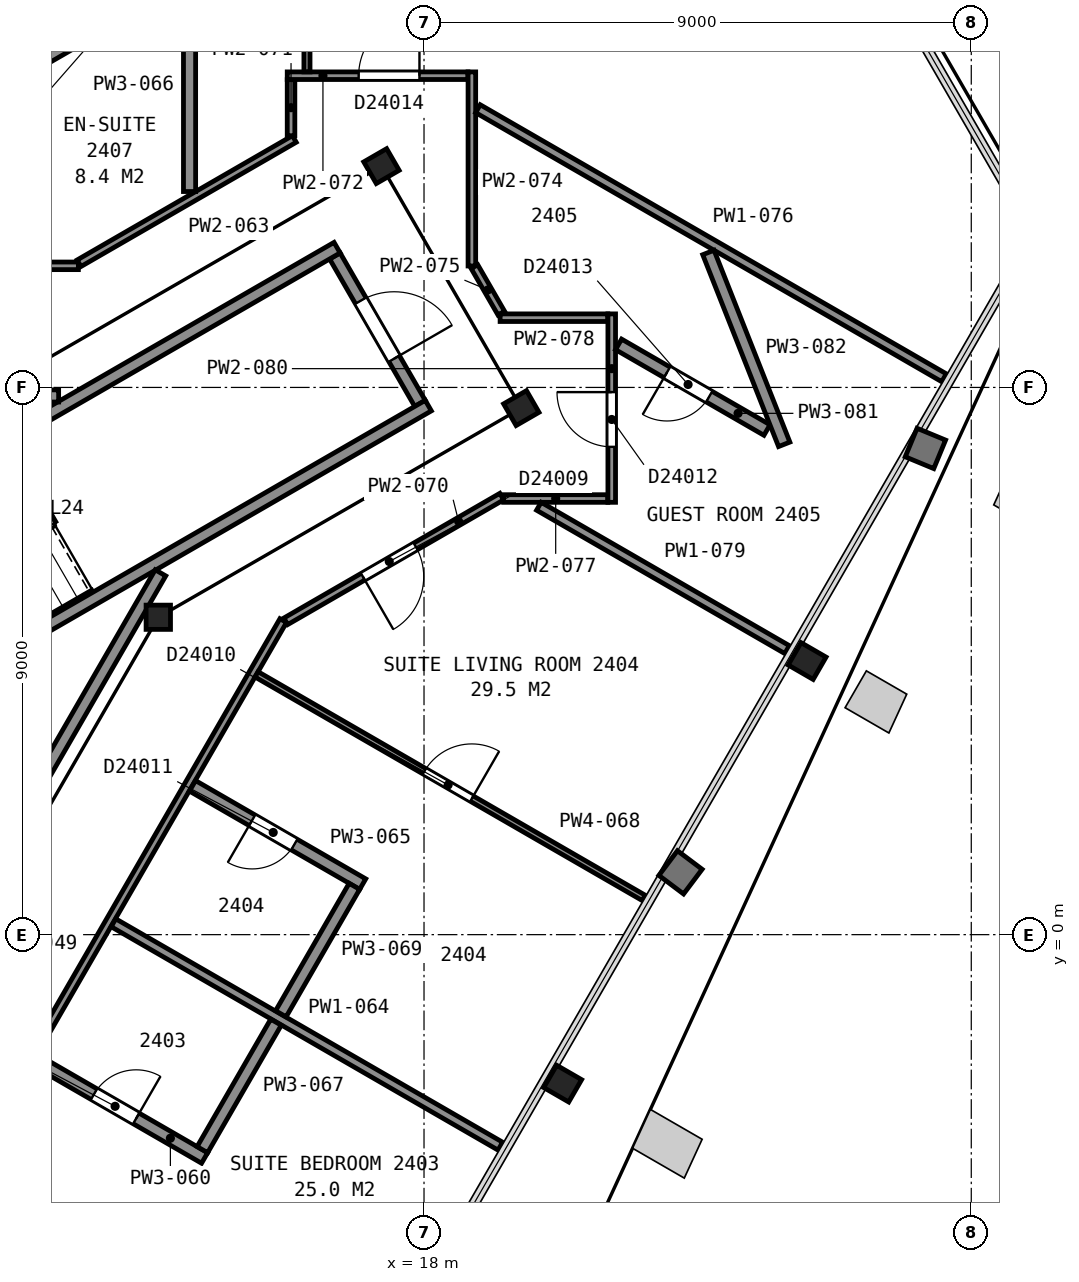
"""IFC4 building model, lengths in metres.
Left out: names, types, materials, properties, quantities, classifications, styles, units other than length and angle.
Written with IfcOpenShell. Run it as: python <this file> out.ifc"""

import sys

from ifc_helpers import new_model, si_unit, direction, frame, frame_2d, origin, origin_2d, place, context, subcontext, project, spatial, rectangle, i_section, extrude, element, fill, save


model = new_model("IFC4")
c1 = context("Model", 3, precision=1e-05, world=origin(), true_north=direction((0.0, 1.0)))
c2 = subcontext(c1, "Body", "Model", "MODEL_VIEW")
j1 = project(units=[si_unit("LENGTHUNIT", "METRE"), si_unit("PLANEANGLEUNIT", "RADIAN")], contexts=[c1])
p1 = place(None, origin())
s1 = spatial("IfcSite", under=j1, at=p1, CompositionType="ELEMENT")
p2 = place(p1, origin())
s2 = spatial("IfcBuilding", under=s1, at=p2, CompositionType="ELEMENT")
p3 = place(p2, frame((0.0, 0.0, 103.6)))
s3 = spatial("IfcBuildingStorey", under=s2, at=p3, CompositionType="ELEMENT", Elevation=103.6)
p4 = place(p3, frame((20.28, -2.45, 0.04), z_axis=(0.0, 0.0, 1.0), x_axis=(-0.5, -0.866025403784, 0.0)))
e1 = element("IfcColumn", 1, at=p4, inside=s3, PredefinedType="COLUMN", context=c2, shape_type="SweptSolid", body=[
    extrude(i_section(OverallWidth=0.424, OverallDepth=0.475, WebThickness=0.048, FlangeThickness=0.077, FilletRadius=0.015, at=origin_2d()), origin(), (0.0, 0.0, 1.0), 3.56),
])
p5 = place(p3, frame((24.3, 4.5, 0.045), z_axis=(0.0, 0.0, 1.0), x_axis=(-0.5, -0.866025403784, 0.0)))
e2 = element("IfcColumn", 2, at=p5, inside=s3, PredefinedType="COLUMN", context=c2, shape_type="SweptSolid", body=[
    extrude(i_section(OverallWidth=0.424, OverallDepth=0.475, WebThickness=0.048, FlangeThickness=0.077, FilletRadius=0.015, at=origin_2d()), origin(), (0.0, 0.0, 1.0), 3.555),
])
p6 = place(p3, frame((13.63, 5.22, 0.0), z_axis=(0.0, 0.0, 1.0), x_axis=(1.0, 0.0, 0.0)))
e3 = element("IfcColumn", 3, at=p6, inside=s3, PredefinedType="COLUMN", context=c2, shape_type="SweptSolid", body=[
    extrude(i_section(OverallWidth=0.401, OverallDepth=0.399, WebThickness=0.025, FlangeThickness=0.04, FilletRadius=0.015, at=origin_2d()), origin(), (0.0, 0.0, 1.0), 3.6),
])
for number, where, z_axis, x_axis in (
    (4, (19.6, 8.66, 0.0), (0.0, 0.0, 1.0), (0.5, -0.866, 0.0)),
    (5, (17.3, 12.64, 0.0), (0.0, 0.0, 1.0), (0.5, -0.866, 0.0)),
):
    element("IfcColumn", number, at=place(p3, frame(where, z_axis=z_axis, x_axis=x_axis)), inside=s3, PredefinedType="COLUMN", context=c2, shape_type="SweptSolid", body=[
        extrude(i_section(OverallWidth=0.411, OverallDepth=0.434, WebThickness=0.036, FlangeThickness=0.057, FilletRadius=0.015, at=origin_2d()), origin(), (0.0, 0.0, 1.0), 3.6),
    ])
p7 = place(p3, frame((17.934, 8.738, 0.0), z_axis=(0.0, 0.0, 1.0), x_axis=(-0.49998411664, 0.866034573852, 0.0)))
e6 = element("IfcWall", 6, at=p7, inside=s3, PredefinedType="PARTITIONING", context=c2, shape_type="SweptSolid", body=[
    extrude(rectangle(XDim=2.8, YDim=0.2, at=frame_2d((1.4, 0.0))), origin(), (0.0, 0.0, 1.0), 3.35),
])
p8 = place(p7, frame((0.85, 0.0, 0.0)))
e7 = element("IfcOpeningElement", 7, at=p8, cuts=e6, PredefinedType="OPENING", context=c2, shape_type="SweptSolid", body=[
    extrude(rectangle(XDim=1.1, YDim=2.1, at=frame_2d((0.55, 1.05))), frame((0.0, 0.11, 0.0), z_axis=(0.0, -1.0, 0.0), x_axis=(1.0, 0.0, 0.0)), (0.0, 0.0, 1.0), 0.22),
])
for number, where, z_axis, x_axis in (
    (8, (6.178, 5.299, 0.0), (0.0, 0.0, 1.0), (0.866, 0.5, 0.0)),
    (9, (7.678, 2.701, 0.0), (0.0, 0.0, 1.0), (0.866, 0.5, 0.0)),
):
    element("IfcWall", number, at=place(p3, frame(where, z_axis=z_axis, x_axis=x_axis)), inside=s3, PredefinedType="PARTITIONING", context=c2, shape_type="SweptSolid", body=[
        extrude(rectangle(XDim=12.0, YDim=0.2, at=frame_2d((6.0, 0.0))), origin(), (0.0, 0.0, 1.0), 3.35),
    ])
p9 = place(p3, frame((6.177, 8.86, 0.0), z_axis=(0.0, 0.0, 1.0), x_axis=(1.0, 0.0, 0.0)))
e10 = element("IfcWall", 10, at=p9, inside=s3, PredefinedType="PARTITIONING", context=c2, shape_type="SweptSolid", body=[
    extrude(rectangle(XDim=5.814, YDim=0.2, at=frame_2d((2.907, 0.0))), origin(), (0.0, 0.0, 1.0), 3.35),
])
p10 = place(p3, frame((8.492, -3.012, 0.0), z_axis=(0.0, 0.0, 1.0), x_axis=(0.499972957231, 0.866041016371, 0.0)))
e11 = element("IfcWall", 11, at=p10, inside=s3, PredefinedType="PARTITIONING", context=c2, shape_type="SweptSolid", body=[
    extrude(rectangle(XDim=10.349, YDim=0.2, at=frame_2d((5.174, 0.0))), origin(), (0.0, 0.0, 1.0), 3.35),
])
p11 = place(p3, frame((-12.315, 11.0, 0.0), z_axis=(0.0, 0.0, 1.0), x_axis=(1.0, 0.0, 0.0)))
e12 = element("IfcWall", 12, at=p11, inside=s3, PredefinedType="PARTITIONING", context=c2, shape_type="SweptSolid", body=[
    extrude(rectangle(XDim=24.631, YDim=0.125, at=frame_2d((12.315, 0.0))), origin(), (0.0, 0.0, 1.0), 2.613),
])
p12 = place(p11, frame((16.545, 0.0, 0.0)))
e13 = element("IfcOpeningElement", 13, at=p12, cuts=e12, PredefinedType="OPENING", context=c2, shape_type="SweptSolid", body=[
    extrude(rectangle(XDim=1.0, YDim=2.1, at=frame_2d((0.5, 1.05))), frame((0.0, 0.073, 0.0), z_axis=(0.0, -1.0, 0.0), x_axis=(1.0, 0.0, 0.0)), (0.0, 0.0, 1.0), 0.145),
])
p13 = place(p11, frame((12.986, 0.0, 0.0)))
e14 = element("IfcOpeningElement", 14, at=p13, cuts=e12, PredefinedType="OPENING", context=c2, shape_type="SweptSolid", body=[
    extrude(rectangle(XDim=0.9, YDim=2.1, at=frame_2d((0.45, 1.05))), frame((0.0, 0.073, 0.0), z_axis=(0.0, -1.0, 0.0), x_axis=(1.0, 0.0, 0.0)), (0.0, 0.0, 1.0), 0.145),
])
p14 = place(p11, frame((2.521, 0.0, 0.0)))
e15 = element("IfcOpeningElement", 15, at=p14, cuts=e12, PredefinedType="OPENING", context=c2, shape_type="SweptSolid", body=[
    extrude(rectangle(XDim=1.0, YDim=2.1, at=frame_2d((0.5, 1.05))), frame((0.0, 0.073, 0.0), z_axis=(0.0, -1.0, 0.0), x_axis=(1.0, 0.0, 0.0)), (0.0, 0.0, 1.0), 0.145),
])
p15 = place(p3, frame((15.684, 5.165, 0.0), z_axis=(0.0, 0.0, 1.0), x_axis=(-0.500027787016, -0.866009360349, 0.0)))
e16 = element("IfcWall", 16, at=p15, inside=s3, PredefinedType="PARTITIONING", context=c2, shape_type="SweptSolid", body=[
    extrude(rectangle(XDim=23.856, YDim=0.125, at=frame_2d((11.928, 0.0))), origin(), (0.0, 0.0, 1.0), 2.613),
])
p16 = place(p15, frame((16.996, 0.0, 0.0)))
e17 = element("IfcOpeningElement", 17, at=p16, cuts=e16, PredefinedType="OPENING", context=c2, shape_type="SweptSolid", body=[
    extrude(rectangle(XDim=1.0, YDim=2.1, at=frame_2d((0.5, 1.05))), frame((0.0, 0.073, 0.0), z_axis=(0.0, -1.0, 0.0), x_axis=(1.0, 0.0, 0.0)), (0.0, 0.0, 1.0), 0.145),
])
p17 = place(p15, frame((12.28, 0.0, 0.0)))
e18 = element("IfcOpeningElement", 18, at=p17, cuts=e16, PredefinedType="OPENING", context=c2, shape_type="SweptSolid", body=[
    extrude(rectangle(XDim=1.0, YDim=2.1, at=frame_2d((0.5, 1.05))), frame((0.0, 0.073, 0.0), z_axis=(0.0, -1.0, 0.0), x_axis=(1.0, 0.0, 0.0)), (0.0, 0.0, 1.0), 0.145),
])
p18 = place(p3, frame((10.53, -3.886, 0.0), z_axis=(0.0, 0.0, 1.0), x_axis=(0.8660606245, -0.499938990969, 0.0)))
e19 = element("IfcWall", 19, at=p18, inside=s3, PredefinedType="PARTITIONING", context=c2, shape_type="SweptSolid", body=[
    extrude(rectangle(XDim=7.353, YDim=0.1, at=frame_2d((3.676, 0.0))), origin(), (0.0, 0.0, 1.0), 2.613),
])
p19 = place(p18, frame((3.188, 0.0, 0.0)))
e20 = element("IfcOpeningElement", 20, at=p19, cuts=e19, PredefinedType="OPENING", context=c2, shape_type="SweptSolid", body=[
    extrude(rectangle(XDim=0.9, YDim=2.1, at=frame_2d((0.45, 1.05))), frame((0.0, 0.06, 0.0), z_axis=(0.0, -1.0, 0.0), x_axis=(1.0, 0.0, 0.0)), (0.0, 0.0, 1.0), 0.12),
])
p20 = place(p3, frame((11.588, -2.054, 0.0), z_axis=(0.0, 0.0, 1.0), x_axis=(0.865983377851, -0.500072783988, 0.0)))
e21 = element("IfcWall", 21, at=p20, inside=s3, PredefinedType="PARTITIONING", context=c2, shape_type="SweptSolid", body=[
    extrude(rectangle(XDim=3.237, YDim=0.2, at=frame_2d((1.619, 0.0))), origin(), (0.0, 0.0, 1.0), 2.613),
])
p21 = place(p20, frame((1.137, 0.0, 0.0)))
e22 = element("IfcOpeningElement", 22, at=p21, cuts=e21, PredefinedType="OPENING", context=c2, shape_type="SweptSolid", body=[
    extrude(rectangle(XDim=0.8, YDim=2.1, at=frame_2d((0.4, 1.05))), frame((0.0, 0.11, 0.0), z_axis=(0.0, -1.0, 0.0), x_axis=(1.0, 0.0, 0.0)), (0.0, 0.0, 1.0), 0.22),
])
p22 = place(p3, frame((13.997, 15.702, 0.0), z_axis=(0.0, 0.0, 1.0), x_axis=(-0.866066100916, -0.499929503874, 0.0)))
e23 = element("IfcWall", 23, at=p22, inside=s3, PredefinedType="PARTITIONING", context=c2, shape_type="SweptSolid", body=[
    extrude(rectangle(XDim=2.688, YDim=0.2, at=frame_2d((1.344, 0.0))), origin(), (0.0, 0.0, 1.0), 2.613),
])
p23 = place(p22, frame((0.932, 0.0, 0.0)))
e24 = element("IfcOpeningElement", 24, at=p23, cuts=e23, PredefinedType="OPENING", context=c2, shape_type="SweptSolid", body=[
    extrude(rectangle(XDim=0.8, YDim=2.1, at=frame_2d((0.4, 1.05))), frame((0.0, 0.11, 0.0), z_axis=(0.0, -1.0, 0.0), x_axis=(1.0, 0.0, 0.0)), (0.0, 0.0, 1.0), 0.22),
])
p24 = place(p3, frame((12.327, 11.042, 0.0), z_axis=(0.0, 0.0, 1.0), x_axis=(0.866070231021, 0.499922348909, 0.0)))
e25 = element("IfcWall", 25, at=p24, inside=s3, PredefinedType="PARTITIONING", context=c2, shape_type="SweptSolid", body=[
    extrude(rectangle(XDim=4.088, YDim=0.125, at=frame_2d((2.044, 0.0))), origin(), (0.0, 0.0, 1.0), 2.613),
])
p25 = place(p3, frame((12.893, 0.195, 0.0), z_axis=(0.0, 0.0, 1.0), x_axis=(0.865995225926, -0.500052265941, 0.0)))
e26 = element("IfcWall", 26, at=p25, inside=s3, PredefinedType="PARTITIONING", context=c2, shape_type="SweptSolid", body=[
    extrude(rectangle(XDim=7.347, YDim=0.15, at=frame_2d((3.674, 0.0))), origin(), (0.0, 0.0, 1.0), 2.613),
])
p26 = place(p3, frame((16.992, 0.831, 0.0), z_axis=(0.0, 0.0, 1.0), x_axis=(-0.866022073929, 0.500005767435, 0.0)))
e27 = element("IfcWall", 27, at=p26, inside=s3, PredefinedType="PARTITIONING", context=c2, shape_type="SweptSolid", body=[
    extrude(rectangle(XDim=3.232, YDim=0.2, at=frame_2d((1.616, 0.0))), origin(), (0.0, 0.0, 1.0), 2.613),
])
p27 = place(p26, frame((1.3, 0.0, 0.0)))
e28 = element("IfcOpeningElement", 28, at=p27, cuts=e27, PredefinedType="OPENING", context=c2, shape_type="SweptSolid", body=[
    extrude(rectangle(XDim=0.8, YDim=2.1, at=frame_2d((0.4, 1.05))), frame((0.0, 0.11, 0.0), z_axis=(0.0, -1.0, 0.0), x_axis=(1.0, 0.0, 0.0)), (0.0, 0.0, 1.0), 0.22),
])
p28 = place(p3, frame((14.144, 12.222, 0.0), z_axis=(0.0, 0.0, 1.0), x_axis=(0.0, 1.0, 0.0)))
e29 = element("IfcWall", 29, at=p28, inside=s3, PredefinedType="PARTITIONING", context=c2, shape_type="SweptSolid", body=[
    extrude(rectangle(XDim=3.665, YDim=0.2, at=frame_2d((1.833, 0.0))), origin(), (0.0, 0.0, 1.0), 2.613),
])
p29 = place(p3, frame((14.355, -3.536, 0.0), z_axis=(0.0, 0.0, 1.0), x_axis=(0.50002218001, 0.866012597771, 0.0)))
e30 = element("IfcWall", 30, at=p29, inside=s3, PredefinedType="PARTITIONING", context=c2, shape_type="SweptSolid", body=[
    extrude(rectangle(XDim=2.421, YDim=0.2, at=frame_2d((1.21, 0.0))), origin(), (0.0, 0.0, 1.0), 2.613),
])
p30 = place(p3, frame((21.613, 0.605, 0.0), z_axis=(0.0, 0.0, 1.0), x_axis=(-0.866021344046, 0.500007031608, 0.0)))
e31 = element("IfcWall", 31, at=p30, inside=s3, PredefinedType="PARTITIONING", context=c2, shape_type="SweptSolid", body=[
    extrude(rectangle(XDim=7.352, YDim=0.1, at=frame_2d((3.676, 0.0))), origin(), (0.0, 0.0, 1.0), 2.613),
])
p31 = place(p30, frame((3.264, 0.0, 0.0)))
e32 = element("IfcOpeningElement", 32, at=p31, cuts=e31, PredefinedType="OPENING", context=c2, shape_type="SweptSolid", body=[
    extrude(rectangle(XDim=0.9, YDim=2.1, at=frame_2d((0.45, 1.05))), frame((0.0, 0.06, 0.0), z_axis=(0.0, -1.0, 0.0), x_axis=(1.0, 0.0, 0.0)), (0.0, 0.0, 1.0), 0.12),
])
p32 = place(p3, frame((15.646, -1.302, 0.0), z_axis=(0.0, 0.0, 1.0), x_axis=(0.499719542643, 0.866187265377, 0.0)))
e33 = element("IfcWall", 33, at=p32, inside=s3, PredefinedType="PARTITIONING", context=c2, shape_type="SweptSolid", body=[
    extrude(rectangle(XDim=2.42, YDim=0.2, at=frame_2d((1.21, 0.0))), origin(), (0.0, 0.0, 1.0), 2.613),
])
p33 = place(p3, frame((19.278, 7.204, 0.0), z_axis=(0.0, 0.0, 1.0), x_axis=(-0.865992261418, -0.50005739987, 0.0)))
e34 = element("IfcWall", 34, at=p33, inside=s3, PredefinedType="PARTITIONING", context=c2, shape_type="SweptSolid", body=[
    extrude(rectangle(XDim=4.101, YDim=0.125, at=frame_2d((2.051, 0.0))), origin(), (0.0, 0.0, 1.0), 2.613),
])
p34 = place(p33, frame((1.636, 0.0, 0.0)))
e35 = element("IfcOpeningElement", 35, at=p34, cuts=e34, PredefinedType="OPENING", context=c2, shape_type="SweptSolid", body=[
    extrude(rectangle(XDim=1.0, YDim=2.1, at=frame_2d((0.5, 1.05))), frame((0.0, 0.073, 0.0), z_axis=(0.0, -1.0, 0.0), x_axis=(1.0, 0.0, 0.0)), (0.0, 0.0, 1.0), 0.145),
])
p35 = place(p3, frame((15.813, 13.14, 0.0), z_axis=(0.0, 0.0, 1.0), x_axis=(0.0, 1.0, 0.0)))
e36 = element("IfcWall", 36, at=p35, inside=s3, PredefinedType="PARTITIONING", context=c2, shape_type="SweptSolid", body=[
    extrude(rectangle(XDim=0.922, YDim=0.125, at=frame_2d((0.461, 0.0))), origin(), (0.0, 0.0, 1.0), 2.613),
])
p36 = place(p3, frame((15.75, 14.127, 0.0), z_axis=(0.0, 0.0, 1.0), x_axis=(1.0, 0.0, 0.0)))
e37 = element("IfcWall", 37, at=p36, inside=s3, PredefinedType="PARTITIONING", context=c2, shape_type="SweptSolid", body=[
    extrude(rectangle(XDim=2.971, YDim=0.125, at=frame_2d((1.486, 0.0))), origin(), (0.0, 0.0, 1.0), 2.613),
])
p37 = place(p36, frame((1.175, 0.0, 0.0)))
e38 = element("IfcOpeningElement", 38, at=p37, cuts=e37, PredefinedType="OPENING", context=c2, shape_type="SweptSolid", body=[
    extrude(rectangle(XDim=1.0, YDim=2.1, at=frame_2d((0.5, 1.05))), frame((0.0, 0.073, 0.0), z_axis=(0.0, -1.0, 0.0), x_axis=(1.0, 0.0, 0.0)), (0.0, 0.0, 1.0), 0.145),
])
p38 = place(p3, frame((16.075, 14.189, 0.0), z_axis=(0.0, 0.0, 1.0), x_axis=(0.0, 1.0, 0.0)))
e39 = element("IfcWall", 39, at=p38, inside=s3, PredefinedType="PARTITIONING", context=c2, shape_type="SweptSolid", body=[
    extrude(rectangle(XDim=4.226, YDim=0.1, at=frame_2d((2.113, 0.0))), origin(), (0.0, 0.0, 1.0), 2.613),
])
p39 = place(p38, frame((1.587, 0.0, 0.0)))
e40 = element("IfcOpeningElement", 40, at=p39, cuts=e39, PredefinedType="OPENING", context=c2, shape_type="SweptSolid", body=[
    extrude(rectangle(XDim=0.9, YDim=2.1, at=frame_2d((0.45, 1.05))), frame((0.0, 0.06, 0.0), z_axis=(0.0, -1.0, 0.0), x_axis=(1.0, 0.0, 0.0)), (0.0, 0.0, 1.0), 0.12),
])
p40 = place(p3, frame((18.787, 10.998, 0.0), z_axis=(0.0, 0.0, 1.0), x_axis=(0.0, 1.0, 0.0)))
e41 = element("IfcWall", 41, at=p40, inside=s3, PredefinedType="PARTITIONING", context=c2, shape_type="SweptSolid", body=[
    extrude(rectangle(XDim=3.192, YDim=0.125, at=frame_2d((1.596, 0.0))), origin(), (0.0, 0.0, 1.0), 2.613),
])
p41 = place(p3, frame((18.83, 10.986, 0.0), z_axis=(0.0, 0.0, 1.0), x_axis=(0.499881837328, -0.866093614288, 0.0)))
e42 = element("IfcWall", 42, at=p41, inside=s3, PredefinedType="PARTITIONING", context=c2, shape_type="SweptSolid", body=[
    extrude(rectangle(XDim=0.884, YDim=0.125, at=frame_2d((0.442, 0.0))), origin(), (0.0, 0.0, 1.0), 2.613),
])
p42 = place(p3, frame((18.887, 13.584, 0.0), z_axis=(0.0, 0.0, 1.0), x_axis=(0.866024349092, -0.500001826776, 0.0)))
e43 = element("IfcWall", 43, at=p42, inside=s3, PredefinedType="PARTITIONING", context=c2, shape_type="SweptSolid", body=[
    extrude(rectangle(XDim=8.851, YDim=0.15, at=frame_2d((4.425, 0.0))), origin(), (0.0, 0.0, 1.0), 2.613),
])
p43 = place(p3, frame((19.309, 7.173, 0.0), z_axis=(0.0, 0.0, 1.0), x_axis=(1.0, 0.0, 0.0)))
e44 = element("IfcWall", 44, at=p43, inside=s3, PredefinedType="PARTITIONING", context=c2, shape_type="SweptSolid", body=[
    extrude(rectangle(XDim=1.713, YDim=0.125, at=frame_2d((0.856, 0.0))), origin(), (0.0, 0.0, 1.0), 2.613),
])
p44 = place(p3, frame((19.251, 10.147, 0.0), z_axis=(0.0, 0.0, 1.0), x_axis=(1.0, 0.0, 0.0)))
e45 = element("IfcWall", 45, at=p44, inside=s3, PredefinedType="PARTITIONING", context=c2, shape_type="SweptSolid", body=[
    extrude(rectangle(XDim=1.771, YDim=0.125, at=frame_2d((0.885, 0.0))), origin(), (0.0, 0.0, 1.0), 2.613),
])
p45 = place(p3, frame((19.889, 7.046, 0.0), z_axis=(0.0, 0.0, 1.0), x_axis=(0.865929380849, -0.500166279733, 0.0)))
e46 = element("IfcWall", 46, at=p45, inside=s3, PredefinedType="PARTITIONING", context=c2, shape_type="SweptSolid", body=[
    extrude(rectangle(XDim=4.714, YDim=0.15, at=frame_2d((2.357, 0.0))), origin(), (0.0, 0.0, 1.0), 2.613),
])
p46 = place(p3, frame((21.087, 10.209, 0.0), z_axis=(0.0, 0.0, 1.0), x_axis=(0.0, -1.0, 0.0)))
e47 = element("IfcWall", 47, at=p46, inside=s3, PredefinedType="PARTITIONING", context=c2, shape_type="SweptSolid", body=[
    extrude(rectangle(XDim=3.099, YDim=0.125, at=frame_2d((1.549, 0.0))), origin(), (0.0, 0.0, 1.0), 2.613),
])
p47 = place(p46, frame((1.287, 0.0, 0.0)))
e48 = element("IfcOpeningElement", 48, at=p47, cuts=e47, PredefinedType="OPENING", context=c2, shape_type="SweptSolid", body=[
    extrude(rectangle(XDim=0.9, YDim=2.1, at=frame_2d((0.45, 1.05))), frame((0.0, 0.073, 0.0), z_axis=(0.0, -1.0, 0.0), x_axis=(1.0, 0.0, 0.0)), (0.0, 0.0, 1.0), 0.145),
])
p48 = place(p3, frame((21.199, 9.708, 0.0), z_axis=(0.0, 0.0, 1.0), x_axis=(0.866129327763, -0.499819955173, 0.0)))
e49 = element("IfcWall", 49, at=p48, inside=s3, PredefinedType="PARTITIONING", context=c2, shape_type="SweptSolid", body=[
    extrude(rectangle(XDim=2.818, YDim=0.2, at=frame_2d((1.409, 0.0))), origin(), (0.0, 0.0, 1.0), 2.613),
])
p49 = place(p48, frame((0.92, 0.0, 0.0)))
e50 = element("IfcOpeningElement", 50, at=p49, cuts=e49, PredefinedType="OPENING", context=c2, shape_type="SweptSolid", body=[
    extrude(rectangle(XDim=0.8, YDim=2.1, at=frame_2d((0.4, 1.05))), frame((0.0, 0.11, 0.0), z_axis=(0.0, -1.0, 0.0), x_axis=(1.0, 0.0, 0.0)), (0.0, 0.0, 1.0), 0.22),
])
p50 = place(p3, frame((22.677, 11.22, 0.0), z_axis=(0.0, 0.0, 1.0), x_axis=(0.36751707294, -0.930016774632, 0.0)))
e51 = element("IfcWall", 51, at=p50, inside=s3, PredefinedType="PARTITIONING", context=c2, shape_type="SweptSolid", body=[
    extrude(rectangle(XDim=3.393, YDim=0.2, at=frame_2d((1.697, 0.0))), origin(), (0.0, 0.0, 1.0), 2.613),
])
p51 = place(p8, origin())
e52 = element("IfcDoor", 52, at=p51, inside=s3, OperationType="SINGLE_SWING_LEFT", PredefinedType="DOOR", context=c2, shape_type="SweptSolid", body=[
    extrude(rectangle(XDim=1.1, YDim=2.1, at=frame_2d((0.55, 1.05))), frame((0.0, 0.025, 0.0), z_axis=(0.0, -1.0, 0.0), x_axis=(1.0, 0.0, 0.0)), (0.0, 0.0, 1.0), 0.05),
])
fill(e7, e52)
p52 = place(p21, origin())
e53 = element("IfcDoor", 53, at=p52, inside=s3, OperationType="SINGLE_SWING_RIGHT", PredefinedType="DOOR", context=c2, shape_type="SweptSolid", body=[
    extrude(rectangle(XDim=0.8, YDim=2.1, at=frame_2d((0.4, 1.05))), frame((0.0, 0.025, 0.0), z_axis=(0.0, -1.0, 0.0), x_axis=(1.0, 0.0, 0.0)), (0.0, 0.0, 1.0), 0.05),
])
fill(e22, e53)
p53 = place(p27, origin())
e54 = element("IfcDoor", 54, at=p53, inside=s3, OperationType="SINGLE_SWING_RIGHT", PredefinedType="DOOR", context=c2, shape_type="SweptSolid", body=[
    extrude(rectangle(XDim=0.8, YDim=2.1, at=frame_2d((0.4, 1.05))), frame((0.0, 0.025, 0.0), z_axis=(0.0, -1.0, 0.0), x_axis=(1.0, 0.0, 0.0)), (0.0, 0.0, 1.0), 0.05),
])
fill(e28, e54)
p54 = place(p31, origin())
e55 = element("IfcDoor", 55, at=p54, inside=s3, OperationType="SINGLE_SWING_LEFT", PredefinedType="DOOR", context=c2, shape_type="SweptSolid", body=[
    extrude(rectangle(XDim=0.9, YDim=2.1, at=frame_2d((0.45, 1.05))), frame((0.0, 0.025, 0.0), z_axis=(0.0, -1.0, 0.0), x_axis=(1.0, 0.0, 0.0)), (0.0, 0.0, 1.0), 0.05),
])
fill(e32, e55)
p55 = place(p34, origin())
e56 = element("IfcDoor", 56, at=p55, inside=s3, OperationType="SINGLE_SWING_RIGHT", PredefinedType="DOOR", context=c2, shape_type="SweptSolid", body=[
    extrude(rectangle(XDim=1.0, YDim=2.1, at=frame_2d((0.5, 1.05))), frame((0.0, 0.025, 0.0), z_axis=(0.0, -1.0, 0.0), x_axis=(1.0, 0.0, 0.0)), (0.0, 0.0, 1.0), 0.05),
])
fill(e35, e56)
p56 = place(p37, origin())
e57 = element("IfcDoor", 57, at=p56, inside=s3, OperationType="SINGLE_SWING_RIGHT", PredefinedType="DOOR", context=c2, shape_type="SweptSolid", body=[
    extrude(rectangle(XDim=1.0, YDim=2.1, at=frame_2d((0.5, 1.05))), frame((0.0, 0.025, 0.0), z_axis=(0.0, -1.0, 0.0), x_axis=(1.0, 0.0, 0.0)), (0.0, 0.0, 1.0), 0.05),
])
fill(e38, e57)
p57 = place(p47, origin())
e58 = element("IfcDoor", 58, at=p57, inside=s3, OperationType="SINGLE_SWING_LEFT", PredefinedType="DOOR", context=c2, shape_type="SweptSolid", body=[
    extrude(rectangle(XDim=0.9, YDim=2.1, at=frame_2d((0.45, 1.05))), frame((0.0, 0.025, 0.0), z_axis=(0.0, -1.0, 0.0), x_axis=(1.0, 0.0, 0.0)), (0.0, 0.0, 1.0), 0.05),
])
fill(e48, e58)
p58 = place(p49, origin())
e59 = element("IfcDoor", 59, at=p58, inside=s3, OperationType="SINGLE_SWING_LEFT", PredefinedType="DOOR", context=c2, shape_type="SweptSolid", body=[
    extrude(rectangle(XDim=0.8, YDim=2.1, at=frame_2d((0.4, 1.05))), frame((0.0, 0.025, 0.0), z_axis=(0.0, -1.0, 0.0), x_axis=(1.0, 0.0, 0.0)), (0.0, 0.0, 1.0), 0.05),
])
fill(e50, e59)
save(model, sys.argv[1])
